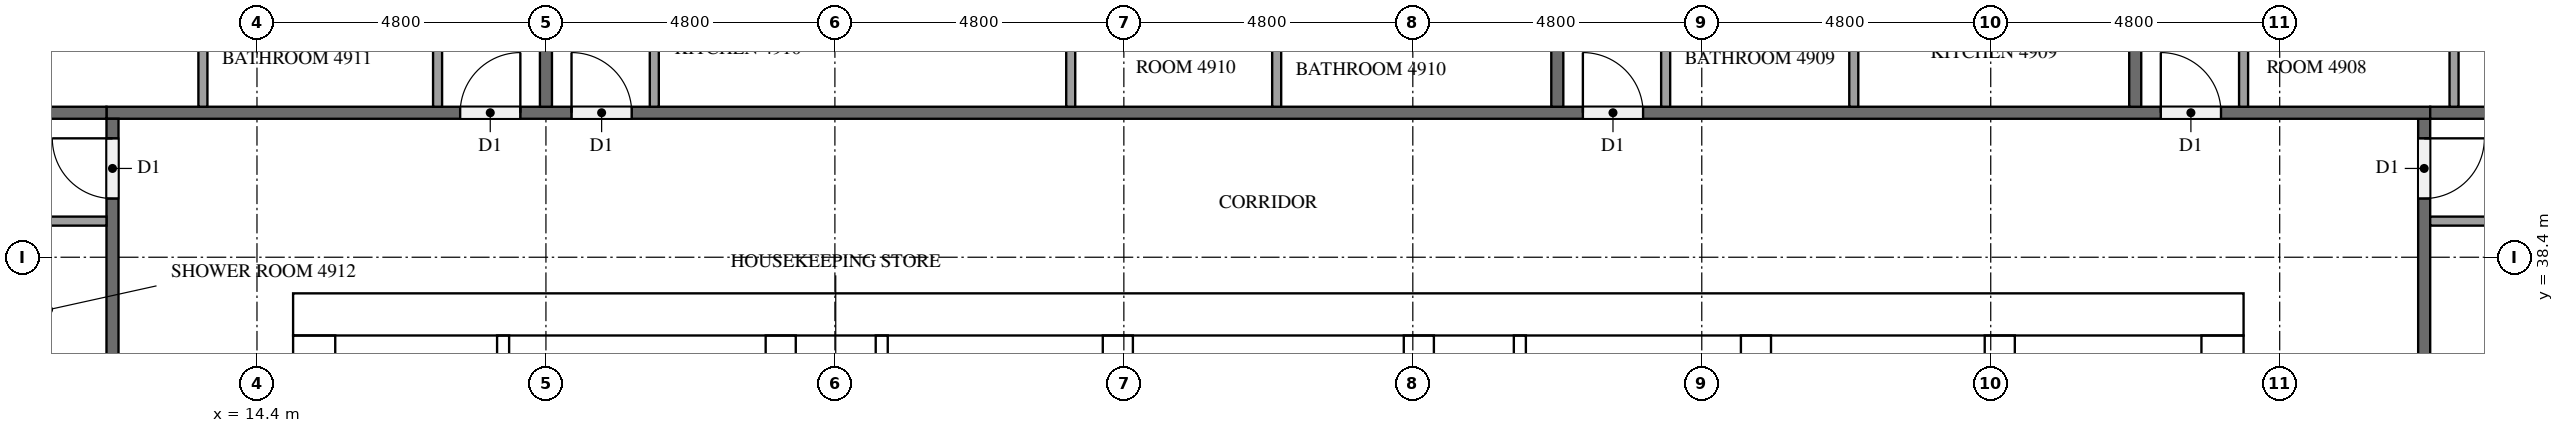
"""IFC4 building model, lengths in metres.
Left out: names, types, materials, properties, quantities, classifications, styles, units other than length and angle.
Written with IfcOpenShell. Run it as: python <this file> out.ifc"""

import sys

from ifc_helpers import new_model, si_unit, direction, frame, frame_2d, origin, place, context, subcontext, project, spatial, rectangle, extrude, element, fill, save


model = new_model("IFC4")
c1 = context("Model", 3, precision=1e-05, world=origin(), true_north=direction((0.0, 1.0)))
c2 = subcontext(c1, "Body", "Model", "MODEL_VIEW")
j1 = project(units=[si_unit("LENGTHUNIT", "METRE"), si_unit("PLANEANGLEUNIT", "RADIAN")], contexts=[c1])
p1 = place(None, origin())
s1 = spatial("IfcSite", under=j1, at=p1, CompositionType="ELEMENT")
p2 = place(p1, origin())
s2 = spatial("IfcBuilding", under=s1, at=p2, CompositionType="ELEMENT")
p3 = place(p2, frame((0.0, 0.0, 189.4)))
s3 = spatial("IfcBuildingStorey", under=s2, at=p3, CompositionType="ELEMENT", Elevation=189.4)
p4 = place(p3, frame((15.0, 37.45, 0.0), z_axis=(0.0, 0.0, 1.0), x_axis=(1.0, 0.0, 0.0)))
e1 = element("IfcWall", 1, at=p4, inside=s3, PredefinedType="SHEAR", context=c2, shape_type="SweptSolid", body=[
    extrude(rectangle(XDim=32.4, YDim=0.7, at=frame_2d((16.2, 0.0))), origin(), (0.0, 0.0, 1.0), 3.2),
])
p5 = place(p4, frame((15.3, 0.0, 0.0)))
e2 = element("IfcOpeningElement", 2, at=p5, cuts=e1, PredefinedType="OPENING", context=c2, shape_type="SweptSolid", body=[
    extrude(rectangle(XDim=1.8, YDim=2.1, at=frame_2d((0.9, 1.05))), frame((0.0, 0.36, 0.0), z_axis=(0.0, -1.0, 0.0), x_axis=(1.0, 0.0, 0.0)), (0.0, 0.0, 1.0), 0.72),
])
p6 = place(p4, frame((1.544, 0.0, 0.0)))
e3 = element("IfcOpeningElement", 3, at=p6, cuts=e1, PredefinedType="OPENING", context=c2, shape_type="SweptSolid", body=[
    extrude(rectangle(XDim=1.0, YDim=2.1, at=frame_2d((0.5, 1.05))), frame((0.0, 0.36, 0.0), z_axis=(0.0, -1.0, 0.0), x_axis=(1.0, 0.0, 0.0)), (0.0, 0.0, 1.0), 0.72),
])
p7 = place(p4, frame((5.219, 0.0, 0.0)))
e4 = element("IfcOpeningElement", 4, at=p7, cuts=e1, PredefinedType="OPENING", context=c2, shape_type="SweptSolid", body=[
    extrude(rectangle(XDim=1.0, YDim=2.1, at=frame_2d((0.5, 1.05))), frame((0.0, 0.36, 0.0), z_axis=(0.0, -1.0, 0.0), x_axis=(1.0, 0.0, 0.0)), (0.0, 0.0, 1.0), 0.72),
])
p8 = place(p3, frame((15.35, 15.7, 0.0), z_axis=(0.0, 0.0, 1.0), x_axis=(0.0, 1.0, 0.0)))
e5 = element("IfcWall", 5, at=p8, inside=s3, PredefinedType="SHEAR", context=c2, shape_type="SweptSolid", body=[
    extrude(rectangle(XDim=21.4, YDim=0.7, at=frame_2d((10.7, 0.0))), origin(), (0.0, 0.0, 1.0), 3.2),
])
p9 = place(p8, frame((5.06, 0.0, 0.0)))
e6 = element("IfcOpeningElement", 6, at=p9, cuts=e5, PredefinedType="OPENING", context=c2, shape_type="SweptSolid", body=[
    extrude(rectangle(XDim=1.2, YDim=2.1, at=frame_2d((0.6, 1.05))), frame((0.0, 0.36, 0.0), z_axis=(0.0, -1.0, 0.0), x_axis=(1.0, 0.0, 0.0)), (0.0, 0.0, 1.0), 0.72),
])
p10 = place(p3, frame((47.05, 15.7, 0.0), z_axis=(0.0, 0.0, 1.0), x_axis=(0.0, 1.0, 0.0)))
e7 = element("IfcWall", 7, at=p10, inside=s3, PredefinedType="SHEAR", context=c2, shape_type="SweptSolid", body=[
    extrude(rectangle(XDim=21.4, YDim=0.7, at=frame_2d((10.7, 0.0))), origin(), (0.0, 0.0, 1.0), 3.2),
])
p11 = place(p10, frame((10.4, 0.0, 0.0)))
e8 = element("IfcOpeningElement", 8, at=p11, cuts=e7, PredefinedType="OPENING", context=c2, shape_type="SweptSolid", body=[
    extrude(rectangle(XDim=1.2, YDim=2.1, at=frame_2d((0.6, 1.05))), frame((0.0, 0.36, 0.0), z_axis=(0.0, -1.0, 0.0), x_axis=(1.0, 0.0, 0.0)), (0.0, 0.0, 1.0), 0.72),
])
p12 = place(p3, frame((23.1, 15.7, 0.0), z_axis=(0.0, 0.0, 1.0), x_axis=(0.0, 1.0, 0.0)))
e9 = element("IfcWall", 9, at=p12, inside=s3, PredefinedType="SHEAR", context=c2, shape_type="SweptSolid", body=[
    extrude(rectangle(XDim=21.4, YDim=0.5, at=frame_2d((10.7, 0.0))), origin(), (0.0, 0.0, 1.0), 3.2),
])
p13 = place(p3, frame((39.3, 27.75, 0.0), z_axis=(0.0, 0.0, 1.0), x_axis=(0.0, 1.0, 0.0)))
e10 = element("IfcWall", 10, at=p13, inside=s3, PredefinedType="SHEAR", context=c2, shape_type="SweptSolid", body=[
    extrude(rectangle(XDim=9.35, YDim=0.5, at=frame_2d((4.675, 0.0))), origin(), (0.0, 0.0, 1.0), 3.2),
])
p14 = place(p3, frame((43.35, 27.75, 0.0), z_axis=(0.0, 0.0, 1.0), x_axis=(0.0, 1.0, 0.0)))
e11 = element("IfcWall", 11, at=p14, inside=s3, PredefinedType="SHEAR", context=c2, shape_type="SweptSolid", body=[
    extrude(rectangle(XDim=9.35, YDim=0.5, at=frame_2d((4.675, 0.0))), origin(), (0.0, 0.0, 1.0), 3.2),
])
p15 = place(p14, frame((7.65, 0.0, 0.0)))
e12 = element("IfcOpeningElement", 12, at=p15, cuts=e11, PredefinedType="OPENING", context=c2, shape_type="SweptSolid", body=[
    extrude(rectangle(XDim=1.2, YDim=2.1, at=frame_2d((0.6, 1.05))), frame((0.0, 0.26, 0.0), z_axis=(0.0, -1.0, 0.0), x_axis=(1.0, 0.0, 0.0)), (0.0, 0.0, 1.0), 0.52),
])
for number, where, z_axis, x_axis in (
    (13, (28.7, 33.8, 0.0), (0.0, 0.0, 1.0), (0.0, 1.0, 0.0)),
    (14, (33.7, 33.8, 0.0), (0.0, 0.0, 1.0), (0.0, 1.0, 0.0)),
):
    element("IfcWall", number, at=place(p3, frame(where, z_axis=z_axis, x_axis=x_axis)), inside=s3, PredefinedType="SHEAR", context=c2, shape_type="SweptSolid", body=[
        extrude(rectangle(XDim=3.3, YDim=0.5, at=frame_2d((1.65, 0.0))), origin(), (0.0, 0.0, 1.0), 3.2),
    ])
p16 = place(p3, frame((18.489, 31.5, 0.0), z_axis=(0.0, 0.0, 1.0), x_axis=(0.0, 1.0, 0.0)))
e15 = element("IfcWall", 15, at=p16, inside=s3, PredefinedType="PARTITIONING", context=c2, shape_type="SweptSolid", body=[
    extrude(rectangle(XDim=5.6, YDim=0.2, at=frame_2d((2.8, 0.0))), origin(), (0.0, 0.0, 1.0), 3.2),
])
for number, where, z_axis, x_axis in (
    (16, (24.778, 33.8, 0.0), (0.0, 0.0, 1.0), (0.0, 1.0, 0.0)),
    (17, (35.378, 33.8, 0.0), (0.0, 0.0, 1.0), (0.0, 1.0, 0.0)),
):
    element("IfcWall", number, at=place(p3, frame(where, z_axis=z_axis, x_axis=x_axis)), inside=s3, PredefinedType="PARTITIONING", context=c2, shape_type="SweptSolid", body=[
        extrude(rectangle(XDim=3.3, YDim=0.2, at=frame_2d((1.65, 0.0))), origin(), (0.0, 0.0, 1.0), 3.2),
    ])
p17 = place(p3, frame((50.4, 40.7, 0.0), z_axis=(0.0, 0.0, 1.0), x_axis=(0.0, -1.0, 0.0)))
e18 = element("IfcWall", 18, at=p17, inside=s3, PredefinedType="PARTITIONING", context=c2, shape_type="SweptSolid", body=[
    extrude(rectangle(XDim=28.6, YDim=0.2, at=frame_2d((14.3, 0.0))), origin(), (0.0, 0.0, 1.0), 3.2),
])
p18 = place(p17, frame((21.925, 0.0, 0.0)))
e19 = element("IfcOpeningElement", 19, at=p18, cuts=e18, PredefinedType="OPENING", context=c2, shape_type="SweptSolid", body=[
    extrude(rectangle(XDim=1.0, YDim=2.1, at=frame_2d((0.5, 1.05))), frame((0.0, 0.11, 0.0), z_axis=(0.0, -1.0, 0.0), x_axis=(1.0, 0.0, 0.0)), (0.0, 0.0, 1.0), 0.22),
])
p19 = place(p17, frame((20.075, 0.0, 0.0)))
e20 = element("IfcOpeningElement", 20, at=p19, cuts=e18, PredefinedType="OPENING", context=c2, shape_type="SweptSolid", body=[
    extrude(rectangle(XDim=1.0, YDim=2.1, at=frame_2d((0.5, 1.05))), frame((0.0, 0.11, 0.0), z_axis=(0.0, -1.0, 0.0), x_axis=(1.0, 0.0, 0.0)), (0.0, 0.0, 1.0), 0.22),
])
p20 = place(p17, frame((0.325, 0.0, 0.0)))
e21 = element("IfcOpeningElement", 21, at=p20, cuts=e18, PredefinedType="OPENING", context=c2, shape_type="SweptSolid", body=[
    extrude(rectangle(XDim=1.0, YDim=2.1, at=frame_2d((0.5, 1.05))), frame((0.0, 0.11, 0.0), z_axis=(0.0, -1.0, 0.0), x_axis=(1.0, 0.0, 0.0)), (0.0, 0.0, 1.0), 0.22),
])
p21 = place(p3, frame((11.9, 40.8, 0.0), z_axis=(0.0, 0.0, 1.0), x_axis=(1.0, 0.0, 0.0)))
e22 = element("IfcWall", 22, at=p21, inside=s3, PredefinedType="PARTITIONING", context=c2, shape_type="SweptSolid", body=[
    extrude(rectangle(XDim=38.6, YDim=0.2, at=frame_2d((19.3, 0.0))), origin(), (0.0, 0.0, 1.0), 3.2),
])
p22 = place(p21, frame((34.125, 0.0, 0.0)))
e23 = element("IfcOpeningElement", 23, at=p22, cuts=e22, PredefinedType="OPENING", context=c2, shape_type="SweptSolid", body=[
    extrude(rectangle(XDim=1.0, YDim=2.1, at=frame_2d((0.5, 1.05))), frame((0.0, 0.11, 0.0), z_axis=(0.0, -1.0, 0.0), x_axis=(1.0, 0.0, 0.0)), (0.0, 0.0, 1.0), 0.22),
])
p23 = place(p21, frame((24.525, 0.0, 0.0)))
e24 = element("IfcOpeningElement", 24, at=p23, cuts=e22, PredefinedType="OPENING", context=c2, shape_type="SweptSolid", body=[
    extrude(rectangle(XDim=1.0, YDim=2.1, at=frame_2d((0.5, 1.05))), frame((0.0, 0.11, 0.0), z_axis=(0.0, -1.0, 0.0), x_axis=(1.0, 0.0, 0.0)), (0.0, 0.0, 1.0), 0.22),
])
p24 = place(p21, frame((7.725, 0.0, 0.0)))
e25 = element("IfcOpeningElement", 25, at=p24, cuts=e22, PredefinedType="OPENING", context=c2, shape_type="SweptSolid", body=[
    extrude(rectangle(XDim=1.0, YDim=2.1, at=frame_2d((0.5, 1.05))), frame((0.0, 0.11, 0.0), z_axis=(0.0, -1.0, 0.0), x_axis=(1.0, 0.0, 0.0)), (0.0, 0.0, 1.0), 0.22),
])
p25 = place(p21, frame((5.875, 0.0, 0.0)))
e26 = element("IfcOpeningElement", 26, at=p25, cuts=e22, PredefinedType="OPENING", context=c2, shape_type="SweptSolid", body=[
    extrude(rectangle(XDim=1.0, YDim=2.1, at=frame_2d((0.5, 1.05))), frame((0.0, 0.11, 0.0), z_axis=(0.0, -1.0, 0.0), x_axis=(1.0, 0.0, 0.0)), (0.0, 0.0, 1.0), 0.22),
])
p26 = place(p3, frame((12.0, 12.1, 0.0), z_axis=(0.0, 0.0, 1.0), x_axis=(0.0, 1.0, 0.0)))
e27 = element("IfcWall", 27, at=p26, inside=s3, PredefinedType="PARTITIONING", context=c2, shape_type="SweptSolid", body=[
    extrude(rectangle(XDim=28.6, YDim=0.2, at=frame_2d((14.3, 0.0))), origin(), (0.0, 0.0, 1.0), 3.2),
])
p27 = place(p26, frame((27.275, 0.0, 0.0)))
e28 = element("IfcOpeningElement", 28, at=p27, cuts=e27, PredefinedType="OPENING", context=c2, shape_type="SweptSolid", body=[
    extrude(rectangle(XDim=1.0, YDim=2.1, at=frame_2d((0.5, 1.05))), frame((0.0, 0.11, 0.0), z_axis=(0.0, -1.0, 0.0), x_axis=(1.0, 0.0, 0.0)), (0.0, 0.0, 1.0), 0.22),
])
p28 = place(p26, frame((0.325, 0.0, 0.0)))
e29 = element("IfcOpeningElement", 29, at=p28, cuts=e27, PredefinedType="OPENING", context=c2, shape_type="SweptSolid", body=[
    extrude(rectangle(XDim=1.0, YDim=2.1, at=frame_2d((0.5, 1.05))), frame((0.0, 0.11, 0.0), z_axis=(0.0, -1.0, 0.0), x_axis=(1.0, 0.0, 0.0)), (0.0, 0.0, 1.0), 0.22),
])
p29 = place(p3, frame((50.5, 40.8, 0.0), z_axis=(0.0, 0.0, 1.0), x_axis=(1.0, 0.0, 0.0)))
e30 = element("IfcWall", 30, at=p29, inside=s3, PredefinedType="PARTITIONING", context=c2, shape_type="SweptSolid", body=[
    extrude(rectangle(XDim=11.8, YDim=0.2, at=frame_2d((5.9, 0.0))), origin(), (0.0, 0.0, 1.0), 3.2),
])
for number, where, z_axis, x_axis in (
    (31, (45.6, 47.9, 0.0), (0.0, 0.0, 1.0), (0.0, -1.0, 0.0)),
    (32, (36.0, 47.9, 0.0), (0.0, 0.0, 1.0), (0.0, -1.0, 0.0)),
):
    element("IfcWall", number, at=place(p3, frame(where, z_axis=z_axis, x_axis=x_axis)), inside=s3, PredefinedType="PARTITIONING", context=c2, shape_type="SweptSolid", body=[
        extrude(rectangle(XDim=7.0, YDim=0.2, at=frame_2d((3.5, 0.0))), origin(), (0.0, 0.0, 1.0), 3.2),
    ])
p30 = place(p3, frame((19.2, 47.675, 0.0), z_axis=(0.0, 0.0, 1.0), x_axis=(0.0, -1.0, 0.0)))
e33 = element("IfcWall", 33, at=p30, inside=s3, PredefinedType="PARTITIONING", context=c2, shape_type="SweptSolid", body=[
    extrude(rectangle(XDim=6.775, YDim=0.2, at=frame_2d((3.388, 0.0))), origin(), (0.0, 0.0, 1.0), 3.2),
])
p31 = place(p3, frame((4.9, 40.8, 0.0), z_axis=(0.0, 0.0, 1.0), x_axis=(1.0, 0.0, 0.0)))
e34 = element("IfcWall", 34, at=p31, inside=s3, PredefinedType="PARTITIONING", context=c2, shape_type="SweptSolid", body=[
    extrude(rectangle(XDim=7.0, YDim=0.2, at=frame_2d((3.5, 0.0))), origin(), (0.0, 0.0, 1.0), 3.2),
])
p32 = place(p3, frame((50.5, 39.0, 0.0), z_axis=(0.0, 0.0, 1.0), x_axis=(1.0, 0.0, 0.0)))
e35 = element("IfcWall", 35, at=p32, inside=s3, PredefinedType="PARTITIONING", context=c2, shape_type="SweptSolid", body=[
    extrude(rectangle(XDim=3.875, YDim=0.15, at=frame_2d((1.938, 0.0))), origin(), (0.0, 0.0, 1.0), 3.2),
])
p33 = place(p3, frame((50.896, 40.9, 0.0), z_axis=(0.0, 0.0, 1.0), x_axis=(0.0, 1.0, 0.0)))
e36 = element("IfcWall", 36, at=p33, inside=s3, PredefinedType="PARTITIONING", context=c2, shape_type="SweptSolid", body=[
    extrude(rectangle(XDim=1.925, YDim=0.15, at=frame_2d((0.962, 0.0))), origin(), (0.0, 0.0, 1.0), 3.2),
])
p34 = place(p3, frame((47.4, 40.9, 0.0), z_axis=(0.0, 0.0, 1.0), x_axis=(0.0, 1.0, 0.0)))
e37 = element("IfcWall", 37, at=p34, inside=s3, PredefinedType="PARTITIONING", context=c2, shape_type="SweptSolid", body=[
    extrude(rectangle(XDim=2.075, YDim=0.15, at=frame_2d((1.038, 0.0))), origin(), (0.0, 0.0, 1.0), 3.2),
])
p35 = place(p3, frame((40.925, 40.9, 0.0), z_axis=(0.0, 0.0, 1.0), x_axis=(0.0, 1.0, 0.0)))
e38 = element("IfcWall", 38, at=p35, inside=s3, PredefinedType="PARTITIONING", context=c2, shape_type="SweptSolid", body=[
    extrude(rectangle(XDim=1.775, YDim=0.15, at=frame_2d((0.888, 0.0))), origin(), (0.0, 0.0, 1.0), 3.2),
])
for number, where, z_axis, x_axis in (
    (39, (37.8, 40.9, 0.0), (0.0, 0.0, 1.0), (0.0, 1.0, 0.0)),
    (40, (27.917, 40.9, 0.0), (0.0, 0.0, 1.0), (0.0, 1.0, 0.0)),
    (41, (31.338, 40.9, 0.0), (0.0, 0.0, 1.0), (0.0, 1.0, 0.0)),
):
    element("IfcWall", number, at=place(p3, frame(where, z_axis=z_axis, x_axis=x_axis)), inside=s3, PredefinedType="PARTITIONING", context=c2, shape_type="SweptSolid", body=[
        extrude(rectangle(XDim=1.925, YDim=0.15, at=frame_2d((0.962, 0.0))), origin(), (0.0, 0.0, 1.0), 3.2),
    ])
for number, where, z_axis, x_axis in (
    (42, (21.0, 40.9, 0.0), (0.0, 0.0, 1.0), (0.0, 1.0, 0.0)),
    (43, (13.502, 40.9, 0.0), (0.0, 0.0, 1.0), (0.0, 1.0, 0.0)),
):
    element("IfcWall", number, at=place(p3, frame(where, z_axis=z_axis, x_axis=x_axis)), inside=s3, PredefinedType="PARTITIONING", context=c2, shape_type="SweptSolid", body=[
        extrude(rectangle(XDim=2.075, YDim=0.15, at=frame_2d((1.038, 0.0))), origin(), (0.0, 0.0, 1.0), 3.2),
    ])
p36 = place(p3, frame((17.4, 40.9, 0.0), z_axis=(0.0, 0.0, 1.0), x_axis=(0.0, 1.0, 0.0)))
e44 = element("IfcWall", 44, at=p36, inside=s3, PredefinedType="PARTITIONING", context=c2, shape_type="SweptSolid", body=[
    extrude(rectangle(XDim=2.225, YDim=0.15, at=frame_2d((1.113, 0.0))), origin(), (0.0, 0.0, 1.0), 3.2),
])
p37 = place(p3, frame((11.9, 39.0, 0.0), z_axis=(0.0, 0.0, 1.0), x_axis=(-1.0, 0.0, 0.0)))
e45 = element("IfcWall", 45, at=p37, inside=s3, PredefinedType="PARTITIONING", context=c2, shape_type="SweptSolid", body=[
    extrude(rectangle(XDim=2.075, YDim=0.15, at=frame_2d((1.038, 0.0))), origin(), (0.0, 0.0, 1.0), 3.2),
])
p38 = place(p5, origin())
e46 = element("IfcDoor", 46, at=p38, inside=s3, OperationType="DOUBLE_DOOR_SINGLE_SWING", PredefinedType="DOOR", context=c2, shape_type="SweptSolid", body=[
    extrude(rectangle(XDim=1.8, YDim=2.1, at=frame_2d((0.9, 1.05))), frame((0.0, 0.025, 0.0), z_axis=(0.0, -1.0, 0.0), x_axis=(1.0, 0.0, 0.0)), (0.0, 0.0, 1.0), 0.05),
])
fill(e2, e46)
p39 = place(p6, origin())
e47 = element("IfcDoor", 47, at=p39, inside=s3, OperationType="SINGLE_SWING_RIGHT", PredefinedType="DOOR", context=c2, shape_type="SweptSolid", body=[
    extrude(rectangle(XDim=1.0, YDim=2.1, at=frame_2d((0.5, 1.05))), frame((0.0, 0.025, 0.0), z_axis=(0.0, -1.0, 0.0), x_axis=(1.0, 0.0, 0.0)), (0.0, 0.0, 1.0), 0.05),
])
fill(e3, e47)
p40 = place(p7, origin())
e48 = element("IfcDoor", 48, at=p40, inside=s3, OperationType="SINGLE_SWING_LEFT", PredefinedType="DOOR", context=c2, shape_type="SweptSolid", body=[
    extrude(rectangle(XDim=1.0, YDim=2.1, at=frame_2d((0.5, 1.05))), frame((0.0, 0.025, 0.0), z_axis=(0.0, -1.0, 0.0), x_axis=(1.0, 0.0, 0.0)), (0.0, 0.0, 1.0), 0.05),
])
fill(e4, e48)
p41 = place(p20, origin())
e49 = element("IfcDoor", 49, at=p41, inside=s3, OperationType="SINGLE_SWING_LEFT", PredefinedType="DOOR", context=c2, shape_type="SweptSolid", body=[
    extrude(rectangle(XDim=1.0, YDim=2.1, at=frame_2d((0.5, 1.05))), frame((0.0, 0.025, 0.0), z_axis=(0.0, -1.0, 0.0), x_axis=(1.0, 0.0, 0.0)), (0.0, 0.0, 1.0), 0.05),
])
fill(e21, e49)
p42 = place(p22, origin())
e50 = element("IfcDoor", 50, at=p42, inside=s3, OperationType="SINGLE_SWING_LEFT", PredefinedType="DOOR", context=c2, shape_type="SweptSolid", body=[
    extrude(rectangle(XDim=1.0, YDim=2.1, at=frame_2d((0.5, 1.05))), frame((0.0, 0.025, 0.0), z_axis=(0.0, -1.0, 0.0), x_axis=(1.0, 0.0, 0.0)), (0.0, 0.0, 1.0), 0.05),
])
fill(e23, e50)
p43 = place(p23, origin())
e51 = element("IfcDoor", 51, at=p43, inside=s3, OperationType="SINGLE_SWING_LEFT", PredefinedType="DOOR", context=c2, shape_type="SweptSolid", body=[
    extrude(rectangle(XDim=1.0, YDim=2.1, at=frame_2d((0.5, 1.05))), frame((0.0, 0.025, 0.0), z_axis=(0.0, -1.0, 0.0), x_axis=(1.0, 0.0, 0.0)), (0.0, 0.0, 1.0), 0.05),
])
fill(e24, e51)
p44 = place(p24, origin())
e52 = element("IfcDoor", 52, at=p44, inside=s3, OperationType="SINGLE_SWING_LEFT", PredefinedType="DOOR", context=c2, shape_type="SweptSolid", body=[
    extrude(rectangle(XDim=1.0, YDim=2.1, at=frame_2d((0.5, 1.05))), frame((0.0, 0.025, 0.0), z_axis=(0.0, -1.0, 0.0), x_axis=(1.0, 0.0, 0.0)), (0.0, 0.0, 1.0), 0.05),
])
fill(e25, e52)
p45 = place(p25, origin())
e53 = element("IfcDoor", 53, at=p45, inside=s3, OperationType="SINGLE_SWING_RIGHT", PredefinedType="DOOR", context=c2, shape_type="SweptSolid", body=[
    extrude(rectangle(XDim=1.0, YDim=2.1, at=frame_2d((0.5, 1.05))), frame((0.0, 0.025, 0.0), z_axis=(0.0, -1.0, 0.0), x_axis=(1.0, 0.0, 0.0)), (0.0, 0.0, 1.0), 0.05),
])
fill(e26, e53)
p46 = place(p27, origin())
e54 = element("IfcDoor", 54, at=p46, inside=s3, OperationType="SINGLE_SWING_RIGHT", PredefinedType="DOOR", context=c2, shape_type="SweptSolid", body=[
    extrude(rectangle(XDim=1.0, YDim=2.1, at=frame_2d((0.5, 1.05))), frame((0.0, 0.025, 0.0), z_axis=(0.0, -1.0, 0.0), x_axis=(1.0, 0.0, 0.0)), (0.0, 0.0, 1.0), 0.05),
])
fill(e28, e54)
save(model, sys.argv[1])
